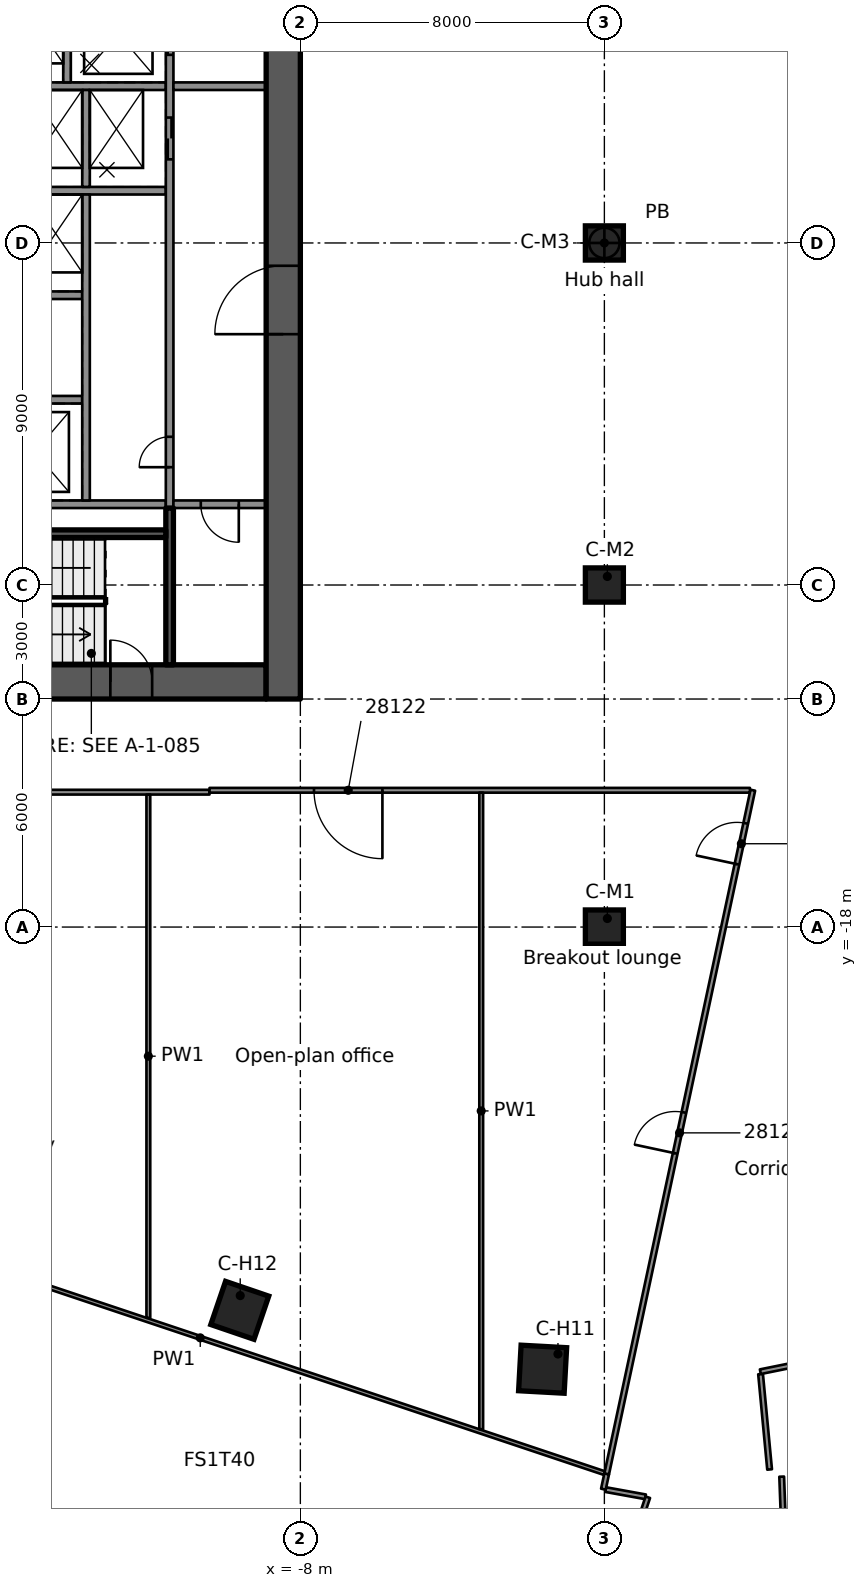
"""IFC4 building model, lengths in metres.
Left out: names, types, materials, properties, quantities, classifications, styles, units other than length and angle.
Written with IfcOpenShell. Run it as: python <this file> out.ifc"""

import sys

from ifc_helpers import new_model, si_unit, direction, frame, frame_2d, origin, origin_2d, place, context, subcontext, project, spatial, rectangle, extrude, element, fill, save


model = new_model("IFC4")
c1 = context("Model", 3, precision=1e-05, world=origin(), true_north=direction((0.0, 1.0)))
c2 = subcontext(c1, "Body", "Model", "MODEL_VIEW")
j1 = project(units=[si_unit("LENGTHUNIT", "METRE"), si_unit("PLANEANGLEUNIT", "RADIAN")], contexts=[c1])
p1 = place(None, origin())
s1 = spatial("IfcSite", under=j1, at=p1, CompositionType="ELEMENT")
p2 = place(p1, origin())
s2 = spatial("IfcBuilding", under=s1, at=p2, CompositionType="ELEMENT")
p3 = place(p2, frame((0.0, 0.0, 145.6)))
s3 = spatial("IfcBuildingStorey", under=s2, at=p3, CompositionType="ELEMENT", Elevation=145.6)
p4 = place(p3, frame((-18.1, -11.55, 0.0), z_axis=(0.0, 0.0, 1.0), x_axis=(1.0, 0.0, 0.0)))
e1 = element("IfcWall", 1, at=p4, inside=s3, PredefinedType="SHEAR", context=c2, shape_type="SweptSolid", body=[
    extrude(rectangle(XDim=9.2, YDim=0.9, at=frame_2d((4.6, 0.0))), origin(), (0.0, 0.0, 1.0), 3.5),
])
p5 = place(p4, frame((5.1, 0.0, 0.0)))
e2 = element("IfcOpeningElement", 2, at=p5, cuts=e1, PredefinedType="OPENING", context=c2, shape_type="SweptSolid", body=[
    extrude(rectangle(XDim=1.1, YDim=2.1, at=frame_2d((0.55, 1.05))), frame((0.0, 0.46, 0.0), z_axis=(0.0, -1.0, 0.0), x_axis=(1.0, 0.0, 0.0)), (0.0, 0.0, 1.0), 0.92),
])
p6 = place(p3, frame((-8.45, -12.0, 0.0), z_axis=(0.0, 0.0, 1.0), x_axis=(0.0, 1.0, 0.0)))
e3 = element("IfcWall", 3, at=p6, inside=s3, PredefinedType="SHEAR", context=c2, shape_type="SweptSolid", body=[
    extrude(rectangle(XDim=24.0, YDim=0.9, at=frame_2d((12.0, 0.0))), origin(), (0.0, 0.0, 1.0), 3.5),
])
p7 = place(p6, frame((9.6, 0.0, 0.0)))
e4 = element("IfcOpeningElement", 4, at=p7, cuts=e3, PredefinedType="OPENING", context=c2, shape_type="SweptSolid", body=[
    extrude(rectangle(XDim=1.8, YDim=2.1, at=frame_2d((0.9, 1.05))), frame((0.0, 0.46, 0.0), z_axis=(0.0, -1.0, 0.0), x_axis=(1.0, 0.0, 0.0)), (0.0, 0.0, 1.0), 0.92),
])
p8 = place(p6, frame((19.65, 0.0, 0.0)))
e5 = element("IfcOpeningElement", 5, at=p8, cuts=e3, PredefinedType="OPENING", context=c2, shape_type="SweptSolid", body=[
    extrude(rectangle(XDim=1.1, YDim=2.1, at=frame_2d((0.55, 1.05))), frame((0.0, 0.46, 0.0), z_axis=(0.0, -1.0, 0.0), x_axis=(1.0, 0.0, 0.0)), (0.0, 0.0, 1.0), 0.92),
])
for number, where, z_axis, x_axis in (
    (6, (-1.625, -29.634, 0.0), (0.0, 0.0, 1.0), (-0.055, -0.998, 0.0)),
    (7, (-9.594, -28.085, 0.0), (0.0, 0.0, 1.0), (-0.323, -0.946, 0.0)),
):
    element("IfcColumn", number, at=place(p3, frame(where, z_axis=z_axis, x_axis=x_axis)), inside=s3, PredefinedType="COLUMN", context=c2, shape_type="SweptSolid", body=[
        extrude(rectangle(XDim=1.2, YDim=1.2, at=origin_2d()), origin(), (0.0, 0.0, 1.0), 3.5),
    ])
for number, where, z_axis, x_axis in (
    (8, (0.0, -18.0, 0.0), (0.0, 0.0, 1.0), (1.0, 0.0, 0.0)),
    (9, (0.0, -9.0, 0.0), (0.0, 0.0, 1.0), (1.0, 0.0, 0.0)),
    (10, (0.0, 0.0, 0.0), (0.0, 0.0, 1.0), (1.0, 0.0, 0.0)),
):
    element("IfcColumn", number, at=place(p3, frame(where, z_axis=z_axis, x_axis=x_axis)), inside=s3, PredefinedType="COLUMN", context=c2, shape_type="SweptSolid", body=[
        extrude(rectangle(XDim=1.0, YDim=0.9, at=origin_2d()), origin(), (0.0, 0.0, 1.0), 3.5),
    ])
p9 = place(p3, frame((-11.54, -6.875, 0.0), z_axis=(0.0, 0.0, 1.0), x_axis=(-1.0, 0.0, 0.0)))
e11 = element("IfcWall", 11, at=p9, inside=s3, PredefinedType="SOLIDWALL", context=c2, shape_type="SweptSolid", body=[
    extrude(rectangle(XDim=6.56, YDim=0.2, at=frame_2d((3.28, 0.0))), origin(), (0.0, 0.0, 1.0), 3.09),
])
p10 = place(p3, frame((-13.74, -4.125, 0.0), z_axis=(0.0, 0.0, 1.0), x_axis=(-1.0, 0.0, 0.0)))
e12 = element("IfcWall", 12, at=p10, inside=s3, PredefinedType="SOLIDWALL", context=c2, shape_type="SweptSolid", body=[
    extrude(rectangle(XDim=2.5, YDim=0.2, at=frame_2d((1.25, 0.0))), origin(), (0.0, 0.0, 1.0), 3.09),
])
p11 = place(p3, frame((-13.74, -1.375, 0.0), z_axis=(0.0, 0.0, 1.0), x_axis=(-1.0, 0.0, 0.0)))
e13 = element("IfcWall", 13, at=p11, inside=s3, PredefinedType="SOLIDWALL", context=c2, shape_type="SweptSolid", body=[
    extrude(rectangle(XDim=2.0, YDim=0.2, at=frame_2d((1.0, 0.0))), origin(), (0.0, 0.0, 1.0), 3.09),
])
p12 = place(p3, frame((-11.54, 1.375, 0.0), z_axis=(0.0, 0.0, 1.0), x_axis=(-1.0, 0.0, 0.0)))
e14 = element("IfcWall", 14, at=p12, inside=s3, PredefinedType="SOLIDWALL", context=c2, shape_type="SweptSolid", body=[
    extrude(rectangle(XDim=4.2, YDim=0.2, at=frame_2d((2.1, 0.0))), origin(), (0.0, 0.0, 1.0), 3.09),
])
p13 = place(p3, frame((-11.54, 4.125, 0.0), z_axis=(0.0, 0.0, 1.0), x_axis=(-1.0, 0.0, 0.0)))
e15 = element("IfcWall", 15, at=p13, inside=s3, PredefinedType="SOLIDWALL", context=c2, shape_type="SweptSolid", body=[
    extrude(rectangle(XDim=4.7, YDim=0.2, at=frame_2d((2.35, 0.0))), origin(), (0.0, 0.0, 1.0), 3.09),
])
p14 = place(p3, frame((-11.44, -6.975, 0.0), z_axis=(0.0, 0.0, 1.0), x_axis=(0.0, 1.0, 0.0)))
e16 = element("IfcWall", 16, at=p14, inside=s3, PredefinedType="SOLIDWALL", context=c2, shape_type="SweptSolid", body=[
    extrude(rectangle(XDim=13.95, YDim=0.2, at=frame_2d((6.975, 0.0))), origin(), (0.0, 0.0, 1.0), 3.09),
])
p15 = place(p14, frame((9.175, 0.0, 0.0)))
e17 = element("IfcOpeningElement", 17, at=p15, cuts=e16, PredefinedType="OPENING", context=c2, shape_type="SweptSolid", body=[
    extrude(rectangle(XDim=1.1, YDim=2.1, at=frame_2d((0.55, 1.05))), frame((0.0, 0.11, 0.0), z_axis=(0.0, -1.0, 0.0), x_axis=(1.0, 0.0, 0.0)), (0.0, 0.0, 1.0), 0.22),
])
p16 = place(p14, frame((11.925, 0.0, 0.0)))
e18 = element("IfcOpeningElement", 18, at=p16, cuts=e16, PredefinedType="OPENING", context=c2, shape_type="SweptSolid", body=[
    extrude(rectangle(XDim=1.1, YDim=2.1, at=frame_2d((0.55, 1.05))), frame((0.0, 0.11, 0.0), z_axis=(0.0, -1.0, 0.0), x_axis=(1.0, 0.0, 0.0)), (0.0, 0.0, 1.0), 0.22),
])
p17 = place(p14, frame((1.075, 0.0, 0.0)))
e19 = element("IfcOpeningElement", 19, at=p17, cuts=e16, PredefinedType="OPENING", context=c2, shape_type="SweptSolid", body=[
    extrude(rectangle(XDim=0.8, YDim=2.1, at=frame_2d((0.4, 1.05))), frame((0.0, 0.11, 0.0), z_axis=(0.0, -1.0, 0.0), x_axis=(1.0, 0.0, 0.0)), (0.0, 0.0, 1.0), 0.22),
])
p18 = place(p3, frame((-13.64, -6.775, 0.0), z_axis=(0.0, 0.0, 1.0), x_axis=(0.0, 1.0, 0.0)))
e20 = element("IfcWall", 20, at=p18, inside=s3, PredefinedType="SOLIDWALL", context=c2, shape_type="SweptSolid", body=[
    extrude(rectangle(XDim=8.05, YDim=0.2, at=frame_2d((4.025, 0.0))), origin(), (0.0, 0.0, 1.0), 3.09),
])
for number, where, z_axis, x_axis in (
    (21, (-13.64, 1.475, 0.0), (0.0, 0.0, 1.0), (0.0, 1.0, 0.0)),
    (22, (-14.14, 4.225, 0.0), (0.0, 0.0, 1.0), (0.0, 1.0, 0.0)),
):
    element("IfcWall", number, at=place(p3, frame(where, z_axis=z_axis, x_axis=x_axis)), inside=s3, PredefinedType="SOLIDWALL", context=c2, shape_type="SweptSolid", body=[
        extrude(rectangle(XDim=2.55, YDim=0.2, at=frame_2d((1.275, 0.0))), origin(), (0.0, 0.0, 1.0), 3.09),
    ])
p19 = place(p3, frame((-11.44, -11.1, 0.0), z_axis=(0.0, 0.0, 1.0), x_axis=(0.0, 1.0, 0.0)))
e23 = element("IfcWall", 23, at=p19, inside=s3, PredefinedType="SOLIDWALL", context=c2, shape_type="SweptSolid", body=[
    extrude(rectangle(XDim=4.125, YDim=0.2, at=frame_2d((2.062, 0.0))), origin(), (0.0, 0.0, 1.0), 3.09),
])
p20 = place(p3, frame((-11.54, -7.65, 0.0), z_axis=(0.0, 0.0, 1.0), x_axis=(-1.0, 0.0, 0.0)))
e24 = element("IfcWall", 24, at=p20, inside=s3, PredefinedType="SOLIDWALL", context=c2, shape_type="SweptSolid", body=[
    extrude(rectangle(XDim=6.56, YDim=0.2, at=frame_2d((3.28, 0.0))), origin(), (0.0, 0.0, 1.0), 3.09),
])
p21 = place(p3, frame((-8.9, 4.125, 0.0), z_axis=(0.0, 0.0, 1.0), x_axis=(-1.0, 0.0, 0.0)))
e25 = element("IfcWall", 25, at=p21, inside=s3, PredefinedType="PARTITIONING", context=c2, shape_type="SweptSolid", body=[
    extrude(rectangle(XDim=2.44, YDim=0.2, at=frame_2d((1.22, 0.0))), origin(), (0.0, 0.0, 1.0), 3.09),
])
p22 = place(p3, frame((-8.9, -6.875, 0.0), z_axis=(0.0, 0.0, 1.0), x_axis=(-1.0, 0.0, 0.0)))
e26 = element("IfcWall", 26, at=p22, inside=s3, PredefinedType="PARTITIONING", context=c2, shape_type="SweptSolid", body=[
    extrude(rectangle(XDim=2.44, YDim=0.2, at=frame_2d((1.22, 0.0))), origin(), (0.0, 0.0, 1.0), 3.09),
])
p23 = place(p22, frame((0.72, 0.0, 0.0)))
e27 = element("IfcOpeningElement", 27, at=p23, cuts=e26, PredefinedType="OPENING", context=c2, shape_type="SweptSolid", body=[
    extrude(rectangle(XDim=1.0, YDim=2.1, at=frame_2d((0.5, 1.05))), frame((0.0, 0.11, 0.0), z_axis=(0.0, -1.0, 0.0), x_axis=(1.0, 0.0, 0.0)), (0.0, 0.0, 1.0), 0.22),
])
p24 = place(p3, frame((4.11, -29.762, 0.0), z_axis=(0.0, 0.0, 1.0), x_axis=(0.094315557951, -0.995542352453, 0.0)))
e28 = element("IfcWall", 28, at=p24, inside=s3, PredefinedType="PARTITIONING", context=c2, shape_type="SweptSolid", body=[
    extrude(rectangle(XDim=2.521, YDim=0.125, at=frame_2d((1.261, 0.0))), origin(), (0.0, 0.0, 1.0), 3.08),
])
p25 = place(p3, frame((4.666, -32.461, 0.0), z_axis=(0.0, 0.0, 1.0), x_axis=(0.03682592513, -0.999321695571, 0.0)))
e29 = element("IfcWall", 29, at=p25, inside=s3, PredefinedType="PARTITIONING", context=c2, shape_type="SweptSolid", body=[
    extrude(rectangle(XDim=1.167, YDim=0.125, at=frame_2d((0.583, 0.0))), origin(), (0.0, 0.0, 1.0), 3.08),
])
p26 = place(p3, frame((-23.366, -30.46, 0.0), z_axis=(0.0, 0.0, 1.0), x_axis=(0.948327494049, -0.317293183083, 0.0)))
e30 = element("IfcWall", 30, at=p26, inside=s3, PredefinedType="PARTITIONING", context=c2, shape_type="SweptSolid", body=[
    extrude(rectangle(XDim=23.988, YDim=0.1, at=frame_2d((11.994, 0.0))), origin(), (0.0, 0.0, 1.0), 3.08),
])
p27 = place(p3, frame((-21.269, -25.25, 0.0), z_axis=(0.0, 0.0, 1.0), x_axis=(0.948309286751, -0.31734759596, 0.0)))
e31 = element("IfcWall", 31, at=p27, inside=s3, PredefinedType="PARTITIONING", context=c2, shape_type="SweptSolid", body=[
    extrude(rectangle(XDim=22.429, YDim=0.1, at=frame_2d((11.215, 0.0))), origin(), (0.0, 0.0, 1.0), 3.08),
])
p28 = place(p3, frame((0.035, -32.802, 0.0), z_axis=(0.0, 0.0, 1.0), x_axis=(0.983943238731, -0.178481659998, 0.0)))
e32 = element("IfcWall", 32, at=p28, inside=s3, PredefinedType="PARTITIONING", context=c2, shape_type="SweptSolid", body=[
    extrude(rectangle(XDim=1.064, YDim=0.125, at=frame_2d((0.532, 0.0))), origin(), (0.0, 0.0, 1.0), 3.08),
])
p29 = place(p3, frame((-17.476, -14.451, 0.0), z_axis=(0.0, 0.0, 1.0), x_axis=(1.0, 0.0, 0.0)))
e33 = element("IfcWall", 33, at=p29, inside=s3, PredefinedType="PARTITIONING", context=c2, shape_type="SweptSolid", body=[
    extrude(rectangle(XDim=7.085, YDim=0.125, at=frame_2d((3.542, 0.0))), origin(), (0.0, 0.0, 1.0), 3.08),
])
p30 = place(p3, frame((3.831, -14.401, 0.0), z_axis=(0.0, 0.0, 1.0), x_axis=(-1.0, 0.0, 0.0)))
e34 = element("IfcWall", 34, at=p30, inside=s3, PredefinedType="PARTITIONING", context=c2, shape_type="SweptSolid", body=[
    extrude(rectangle(XDim=14.221, YDim=0.125, at=frame_2d((7.11, 0.0))), origin(), (0.0, 0.0, 1.0), 3.08),
])
p31 = place(p30, frame((9.672, 0.0, 0.0)))
e35 = element("IfcOpeningElement", 35, at=p31, cuts=e34, PredefinedType="OPENING", context=c2, shape_type="SweptSolid", body=[
    extrude(rectangle(XDim=1.8, YDim=2.1, at=frame_2d((0.9, 1.05))), frame((0.0, 0.073, 0.0), z_axis=(0.0, -1.0, 0.0), x_axis=(1.0, 0.0, 0.0)), (0.0, 0.0, 1.0), 0.145),
])
p32 = place(p3, frame((4.104, -29.7, 0.0), z_axis=(0.0, 0.0, 1.0), x_axis=(0.980027109115, 0.198863936901, 0.0)))
e36 = element("IfcWall", 36, at=p32, inside=s3, PredefinedType="PARTITIONING", context=c2, shape_type="SweptSolid", body=[
    extrude(rectangle(XDim=0.991, YDim=0.125, at=frame_2d((0.495, 0.0))), origin(), (0.0, 0.0, 1.0), 3.08),
])
p33 = place(p3, frame((0.312, -35.488, 0.0), z_axis=(0.0, 0.0, 1.0), x_axis=(0.317149997564, 0.948375389308, 0.0)))
e37 = element("IfcWall", 37, at=p33, inside=s3, PredefinedType="PARTITIONING", context=c2, shape_type="SweptSolid", body=[
    extrude(rectangle(XDim=2.62, YDim=0.125, at=frame_2d((1.31, 0.0))), origin(), (0.0, 0.0, 1.0), 3.08),
])
p34 = place(p33, frame((1.288, 0.0, 0.0)))
e38 = element("IfcOpeningElement", 38, at=p34, cuts=e37, PredefinedType="OPENING", context=c2, shape_type="SweptSolid", body=[
    extrude(rectangle(XDim=0.9, YDim=2.1, at=frame_2d((0.45, 1.05))), frame((0.0, 0.073, 0.0), z_axis=(0.0, -1.0, 0.0), x_axis=(1.0, 0.0, 0.0)), (0.0, 0.0, 1.0), 0.145),
])
p35 = place(p3, frame((-0.026, -32.791, 0.0), z_axis=(0.0, 0.0, 1.0), x_axis=(0.210295516646, 0.977637865305, 0.0)))
e39 = element("IfcWall", 39, at=p35, inside=s3, PredefinedType="PARTITIONING", context=c2, shape_type="SweptSolid", body=[
    extrude(rectangle(XDim=0.413, YDim=0.125, at=frame_2d((0.207, 0.0))), origin(), (0.0, 0.0, 1.0), 3.08),
])
p36 = place(p3, frame((0.061, -32.387, 0.0), z_axis=(0.0, 0.0, 1.0), x_axis=(0.209029624493, 0.977909308721, 0.0)))
e40 = element("IfcWall", 40, at=p36, inside=s3, PredefinedType="PARTITIONING", context=c2, shape_type="SweptSolid", body=[
    extrude(rectangle(XDim=18.394, YDim=0.125, at=frame_2d((9.197, 0.0))), origin(), (0.0, 0.0, 1.0), 3.08),
])
p37 = place(p36, frame((8.624, 0.0, 0.0)))
e41 = element("IfcOpeningElement", 41, at=p37, cuts=e40, PredefinedType="OPENING", context=c2, shape_type="SweptSolid", body=[
    extrude(rectangle(XDim=1.1, YDim=2.1, at=frame_2d((0.55, 1.05))), frame((0.0, 0.073, 0.0), z_axis=(0.0, -1.0, 0.0), x_axis=(1.0, 0.0, 0.0)), (0.0, 0.0, 1.0), 0.145),
])
p38 = place(p36, frame((16.404, 0.0, 0.0)))
e42 = element("IfcOpeningElement", 42, at=p38, cuts=e40, PredefinedType="OPENING", context=c2, shape_type="SweptSolid", body=[
    extrude(rectangle(XDim=1.1, YDim=2.1, at=frame_2d((0.55, 1.05))), frame((0.0, 0.073, 0.0), z_axis=(0.0, -1.0, 0.0), x_axis=(1.0, 0.0, 0.0)), (0.0, 0.0, 1.0), 0.145),
])
p39 = place(p3, frame((-3.241, -31.213, 0.0), z_axis=(0.0, 0.0, 1.0), x_axis=(0.0, 1.0, 0.0)))
e43 = element("IfcWall", 43, at=p39, inside=s3, PredefinedType="PARTITIONING", context=c2, shape_type="SweptSolid", body=[
    extrude(rectangle(XDim=16.75, YDim=0.1, at=frame_2d((8.375, 0.0))), origin(), (0.0, 0.0, 1.0), 3.08),
])
p40 = place(p3, frame((-12.0, -28.282, 0.0), z_axis=(0.0, 0.0, 1.0), x_axis=(0.0, 1.0, 0.0)))
e44 = element("IfcWall", 44, at=p40, inside=s3, PredefinedType="PARTITIONING", context=c2, shape_type="SweptSolid", body=[
    extrude(rectangle(XDim=13.768, YDim=0.1, at=frame_2d((6.884, 0.0))), origin(), (0.0, 0.0, 1.0), 3.08),
])
p41 = place(p15, origin())
e45 = element("IfcDoor", 45, at=p41, inside=s3, OperationType="DOUBLE_DOOR_SLIDING", PredefinedType="DOOR", context=c2, shape_type="SweptSolid", body=[
    extrude(rectangle(XDim=1.1, YDim=2.1, at=frame_2d((0.55, 1.05))), frame((0.0, 0.025, 0.0), z_axis=(0.0, -1.0, 0.0), x_axis=(1.0, 0.0, 0.0)), (0.0, 0.0, 1.0), 0.05),
])
fill(e17, e45)
p42 = place(p16, origin())
e46 = element("IfcDoor", 46, at=p42, inside=s3, OperationType="DOUBLE_DOOR_SLIDING", PredefinedType="DOOR", context=c2, shape_type="SweptSolid", body=[
    extrude(rectangle(XDim=1.1, YDim=2.1, at=frame_2d((0.55, 1.05))), frame((0.0, 0.025, 0.0), z_axis=(0.0, -1.0, 0.0), x_axis=(1.0, 0.0, 0.0)), (0.0, 0.0, 1.0), 0.05),
])
fill(e18, e46)
p43 = place(p17, origin())
e47 = element("IfcDoor", 47, at=p43, inside=s3, OperationType="SINGLE_SWING_LEFT", PredefinedType="DOOR", context=c2, shape_type="SweptSolid", body=[
    extrude(rectangle(XDim=0.8, YDim=2.1, at=frame_2d((0.4, 1.05))), frame((0.0, 0.025, 0.0), z_axis=(0.0, -1.0, 0.0), x_axis=(1.0, 0.0, 0.0)), (0.0, 0.0, 1.0), 0.05),
])
fill(e19, e47)
p44 = place(p7, origin())
e48 = element("IfcDoor", 48, at=p44, inside=s3, OperationType="SINGLE_SWING_LEFT", PredefinedType="DOOR", context=c2, shape_type="SweptSolid", body=[
    extrude(rectangle(XDim=1.8, YDim=2.1, at=frame_2d((0.9, 1.05))), frame((0.0, 0.025, 0.0), z_axis=(0.0, -1.0, 0.0), x_axis=(1.0, 0.0, 0.0)), (0.0, 0.0, 1.0), 0.05),
])
fill(e4, e48)
p45 = place(p5, origin())
e49 = element("IfcDoor", 49, at=p45, inside=s3, OperationType="SINGLE_SWING_RIGHT", PredefinedType="DOOR", context=c2, shape_type="SweptSolid", body=[
    extrude(rectangle(XDim=1.1, YDim=2.1, at=frame_2d((0.55, 1.05))), frame((0.0, 0.025, 0.0), z_axis=(0.0, -1.0, 0.0), x_axis=(1.0, 0.0, 0.0)), (0.0, 0.0, 1.0), 0.05),
])
fill(e2, e49)
p46 = place(p23, origin())
e50 = element("IfcDoor", 50, at=p46, inside=s3, OperationType="SINGLE_SWING_RIGHT", PredefinedType="DOOR", context=c2, shape_type="SweptSolid", body=[
    extrude(rectangle(XDim=1.0, YDim=2.1, at=frame_2d((0.5, 1.05))), frame((0.0, 0.025, 0.0), z_axis=(0.0, -1.0, 0.0), x_axis=(1.0, 0.0, 0.0)), (0.0, 0.0, 1.0), 0.05),
])
fill(e27, e50)
p47 = place(p31, origin())
e51 = element("IfcDoor", 51, at=p47, inside=s3, OperationType="DOUBLE_DOOR_SINGLE_SWING", PredefinedType="DOOR", context=c2, shape_type="SweptSolid", body=[
    extrude(rectangle(XDim=1.8, YDim=2.1, at=frame_2d((0.9, 1.05))), frame((0.0, 0.025, 0.0), z_axis=(0.0, -1.0, 0.0), x_axis=(1.0, 0.0, 0.0)), (0.0, 0.0, 1.0), 0.05),
])
fill(e35, e51)
p48 = place(p37, origin())
e52 = element("IfcDoor", 52, at=p48, inside=s3, OperationType="SINGLE_SWING_LEFT", PredefinedType="DOOR", context=c2, shape_type="SweptSolid", body=[
    extrude(rectangle(XDim=1.1, YDim=2.1, at=frame_2d((0.55, 1.05))), frame((0.0, 0.025, 0.0), z_axis=(0.0, -1.0, 0.0), x_axis=(1.0, 0.0, 0.0)), (0.0, 0.0, 1.0), 0.05),
])
fill(e41, e52)
p49 = place(p38, origin())
e53 = element("IfcDoor", 53, at=p49, inside=s3, OperationType="SINGLE_SWING_RIGHT", PredefinedType="DOOR", context=c2, shape_type="SweptSolid", body=[
    extrude(rectangle(XDim=1.1, YDim=2.1, at=frame_2d((0.55, 1.05))), frame((0.0, 0.025, 0.0), z_axis=(0.0, -1.0, 0.0), x_axis=(1.0, 0.0, 0.0)), (0.0, 0.0, 1.0), 0.05),
])
fill(e42, e53)
save(model, sys.argv[1])
